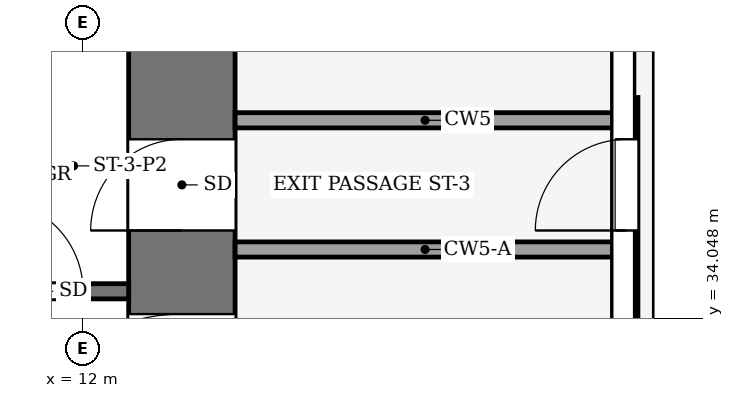
"""IFC4 building model, lengths in metres.
Left out: names, types, materials, properties, quantities, classifications, styles, units other than length and angle.
Written with IfcOpenShell. Run it as: python <this file> out.ifc"""

import sys

from ifc_helpers import new_model, si_unit, direction, frame, frame_2d, origin, place, context, subcontext, project, spatial, rectangle, extrude, element, fill, save


model = new_model("IFC4")
c1 = context("Model", 3, precision=1e-05, world=origin(), true_north=direction((0.0, 1.0)))
c2 = subcontext(c1, "Body", "Model", "MODEL_VIEW")
j1 = project(units=[si_unit("LENGTHUNIT", "METRE"), si_unit("PLANEANGLEUNIT", "RADIAN")], contexts=[c1])
p1 = place(None, origin())
s1 = spatial("IfcSite", under=j1, at=p1, CompositionType="ELEMENT")
p2 = place(p1, origin())
s2 = spatial("IfcBuilding", under=s1, at=p2, CompositionType="ELEMENT")
p3 = place(p2, origin())
s3 = spatial("IfcBuildingStorey", under=s2, at=p3, CompositionType="ELEMENT", Elevation=0.0)
p4 = place(p3, frame((13.3, 18.4, -0.45), z_axis=(0.0, 0.0, 1.0), x_axis=(0.0, 1.0, 0.0)))
e1 = element("IfcWall", 1, at=p4, inside=s3, PredefinedType="SHEAR", context=c2, shape_type="SweptSolid", body=[
    extrude(rectangle(XDim=19.2, YDim=1.4, at=frame_2d((9.6, 0.0))), origin(), (0.0, 0.0, 1.0), 9.32),
])
p5 = place(p4, frame((2.8, 0.0, 0.45)))
e2 = element("IfcOpeningElement", 2, at=p5, cuts=e1, PredefinedType="OPENING", context=c2, shape_type="SweptSolid", body=[
    extrude(rectangle(XDim=2.4, YDim=2.4, at=frame_2d((1.2, 1.2))), frame((0.0, 0.71, 0.0), z_axis=(0.0, -1.0, 0.0), x_axis=(1.0, 0.0, 0.0)), (0.0, 0.0, 1.0), 1.42),
])
p6 = place(p4, frame((13.3, 0.0, 0.45)))
e3 = element("IfcOpeningElement", 3, at=p6, cuts=e1, PredefinedType="OPENING", context=c2, shape_type="SweptSolid", body=[
    extrude(rectangle(XDim=2.4, YDim=2.4, at=frame_2d((1.2, 1.2))), frame((0.0, 0.71, 0.0), z_axis=(0.0, -1.0, 0.0), x_axis=(1.0, 0.0, 0.0)), (0.0, 0.0, 1.0), 1.42),
])
p7 = place(p4, frame((5.85, 0.0, 0.45)))
e4 = element("IfcOpeningElement", 4, at=p7, cuts=e1, PredefinedType="OPENING", context=c2, shape_type="SweptSolid", body=[
    extrude(rectangle(XDim=1.2, YDim=2.2, at=frame_2d((0.6, 1.1))), frame((0.0, 0.71, 0.0), z_axis=(0.0, -1.0, 0.0), x_axis=(1.0, 0.0, 0.0)), (0.0, 0.0, 1.0), 1.42),
])
p8 = place(p4, frame((16.8, 0.0, 0.45)))
e5 = element("IfcOpeningElement", 5, at=p8, cuts=e1, PredefinedType="OPENING", context=c2, shape_type="SweptSolid", body=[
    extrude(rectangle(XDim=1.2, YDim=2.2, at=frame_2d((0.6, 1.1))), frame((0.0, 0.71, 0.0), z_axis=(0.0, -1.0, 0.0), x_axis=(1.0, 0.0, 0.0)), (0.0, 0.0, 1.0), 1.42),
])
p9 = place(p3, frame((19.15, 34.05, 0.0), z_axis=(0.0, 0.0, 1.0), x_axis=(0.0, 1.0, 0.0)))
e6 = element("IfcWall", 6, at=p9, inside=s3, PredefinedType="SOLIDWALL", context=c2, shape_type="SweptSolid", body=[
    extrude(rectangle(XDim=2.9, YDim=0.3, at=frame_2d((1.45, 0.0))), origin(), (0.0, 0.0, 1.0), 3.11),
])
p10 = place(p9, frame((1.15, 0.0, 0.0)))
e7 = element("IfcOpeningElement", 7, at=p10, cuts=e6, PredefinedType="OPENING", context=c2, shape_type="SweptSolid", body=[
    extrude(rectangle(XDim=1.2, YDim=2.2, at=frame_2d((0.6, 1.1))), frame((0.0, 0.16, 0.0), z_axis=(0.0, -1.0, 0.0), x_axis=(1.0, 0.0, 0.0)), (0.0, 0.0, 1.0), 0.32),
])
p11 = place(p3, frame((6.0, 34.4, 0.0), z_axis=(0.0, 0.0, 1.0), x_axis=(1.0, 0.0, 0.0)))
e8 = element("IfcWall", 8, at=p11, inside=s3, PredefinedType="PARTITIONING", context=c2, shape_type="SweptSolid", body=[
    extrude(rectangle(XDim=6.6, YDim=0.2, at=frame_2d((3.3, 0.0))), origin(), (0.0, 0.0, 1.0), 8.87),
])
p12 = place(p11, frame((4.8, 0.0, 0.0)))
e9 = element("IfcOpeningElement", 9, at=p12, cuts=e8, PredefinedType="OPENING", context=c2, shape_type="SweptSolid", body=[
    extrude(rectangle(XDim=1.2, YDim=2.2, at=frame_2d((0.6, 1.1))), frame((0.0, 0.11, 0.0), z_axis=(0.0, -1.0, 0.0), x_axis=(1.0, 0.0, 0.0)), (0.0, 0.0, 1.0), 0.22),
])
p13 = place(p3, frame((14.0, 34.95, 0.0), z_axis=(0.0, 0.0, 1.0), x_axis=(1.0, 0.0, 0.0)))
e10 = element("IfcWall", 10, at=p13, inside=s3, PredefinedType="PARTITIONING", context=c2, shape_type="SweptSolid", body=[
    extrude(rectangle(XDim=5.0, YDim=0.2, at=frame_2d((2.5, 0.0))), origin(), (0.0, 0.0, 1.0), 8.47),
])
p14 = place(p3, frame((14.0, 36.65, 0.0), z_axis=(0.0, 0.0, 1.0), x_axis=(1.0, 0.0, 0.0)))
e11 = element("IfcWall", 11, at=p14, inside=s3, PredefinedType="PARTITIONING", context=c2, shape_type="SweptSolid", body=[
    extrude(rectangle(XDim=5.0, YDim=0.2, at=frame_2d((2.5, 0.0))), origin(), (0.0, 0.0, 1.0), 8.75),
])
p15 = place(p10, origin())
e12 = element("IfcDoor", 12, at=p15, inside=s3, OperationType="SINGLE_SWING_LEFT", PredefinedType="DOOR", context=c2, shape_type="SweptSolid", body=[
    extrude(rectangle(XDim=1.2, YDim=2.2, at=frame_2d((0.6, 1.1))), frame((0.0, 0.025, 0.0), z_axis=(0.0, -1.0, 0.0), x_axis=(1.0, 0.0, 0.0)), (0.0, 0.0, 1.0), 0.05),
])
fill(e7, e12)
p16 = place(p12, origin())
e13 = element("IfcDoor", 13, at=p16, inside=s3, OperationType="SINGLE_SWING_RIGHT", PredefinedType="DOOR", context=c2, shape_type="SweptSolid", body=[
    extrude(rectangle(XDim=1.2, YDim=2.2, at=frame_2d((0.6, 1.1))), frame((0.0, 0.025, 0.0), z_axis=(0.0, -1.0, 0.0), x_axis=(1.0, 0.0, 0.0)), (0.0, 0.0, 1.0), 0.05),
])
fill(e9, e13)
p17 = place(p6, origin())
e14 = element("IfcDoor", 14, at=p17, inside=s3, OperationType="DOUBLE_DOOR_SINGLE_SWING", PredefinedType="DOOR", context=c2, shape_type="SweptSolid", body=[
    extrude(rectangle(XDim=2.4, YDim=2.4, at=frame_2d((1.2, 1.2))), frame((0.0, 0.025, 0.0), z_axis=(0.0, -1.0, 0.0), x_axis=(1.0, 0.0, 0.0)), (0.0, 0.0, 1.0), 0.05),
])
fill(e3, e14)
p18 = place(p8, origin())
e15 = element("IfcDoor", 15, at=p18, inside=s3, OperationType="SINGLE_SWING_RIGHT", PredefinedType="DOOR", context=c2, shape_type="SweptSolid", body=[
    extrude(rectangle(XDim=1.2, YDim=2.2, at=frame_2d((0.6, 1.1))), frame((0.0, 0.7, 0.0), z_axis=(0.0, -1.0, 0.0), x_axis=(1.0, 0.0, 0.0)), (0.0, 0.0, 1.0), 0.05),
])
fill(e5, e15)
save(model, sys.argv[1])
